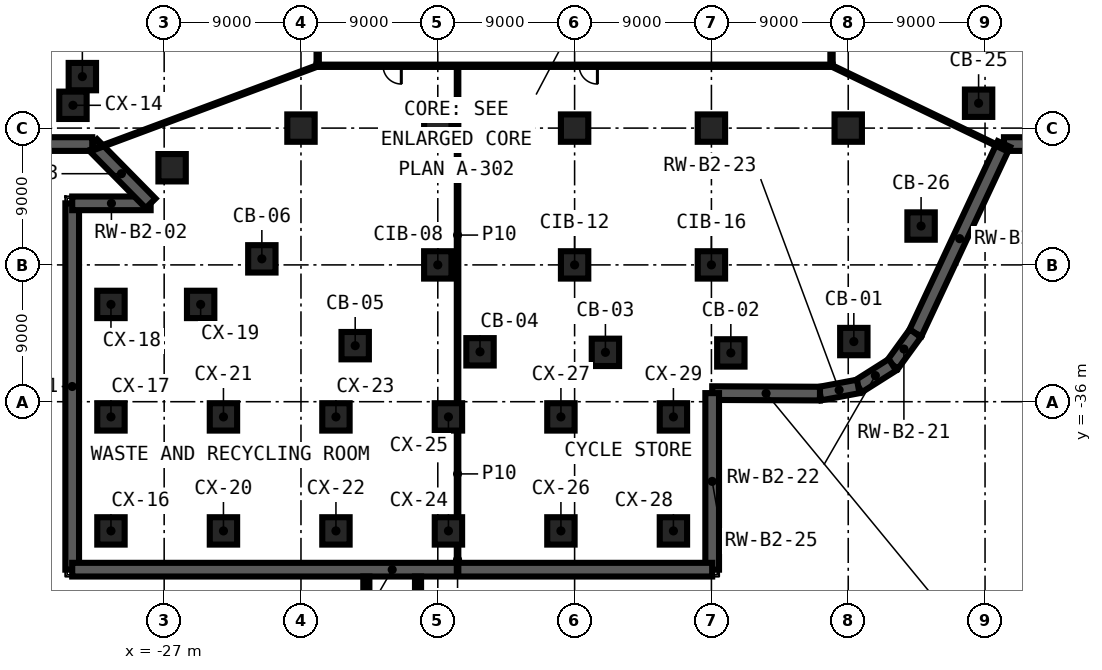
"""IFC4 building model, lengths in metres.
Left out: names, types, materials, properties, quantities, classifications, styles, units other than length and angle.
Written with IfcOpenShell. Run it as: python <this file> out.ifc"""

import sys

from ifc_helpers import new_model, si_unit, direction, frame, frame_2d, origin, origin_2d, place, context, subcontext, project, spatial, rectangle, extrude, element, fill, save


model = new_model("IFC4")
c1 = context("Model", 3, precision=1e-05, world=origin(), true_north=direction((0.0, 1.0)))
c2 = subcontext(c1, "Body", "Model", "MODEL_VIEW")
j1 = project(units=[si_unit("LENGTHUNIT", "METRE"), si_unit("PLANEANGLEUNIT", "RADIAN")], contexts=[c1])
p1 = place(None, origin())
s1 = spatial("IfcSite", under=j1, at=p1, CompositionType="ELEMENT")
p2 = place(p1, origin())
s2 = spatial("IfcBuilding", under=s1, at=p2, CompositionType="ELEMENT")
p3 = place(p2, frame((0.0, 0.0, -11.5)))
s3 = spatial("IfcBuildingStorey", under=s2, at=p3, CompositionType="ELEMENT", Elevation=-11.5)
for number, where, z_axis, x_axis in (
    (1, (18.368, -32.043, 0.0), (0.0, 0.0, 1.0), (1.0, 0.0, 0.0)),
    (2, (10.277, -32.79, 0.0), (0.0, 0.0, 1.0), (1.0, 0.0, 0.0)),
    (3, (2.027, -32.753, 0.0), (0.0, 0.0, 1.0), (1.0, 0.0, 0.0)),
    (4, (-6.222, -32.717, 0.0), (0.0, 0.0, 1.0), (1.0, 0.0, 0.0)),
    (5, (-14.434, -32.313, 0.0), (0.0, 0.0, 1.0), (1.0, 0.0, 0.0)),
    (6, (-20.574, -26.602, 0.0), (0.0, 0.0, 1.0), (1.0, 0.0, 0.0)),
    (7, (-26.478, -20.608, 0.0), (0.0, 0.0, 1.0), (1.0, 0.0, 0.0)),
    (8, (-32.382, -14.613, 0.0), (0.0, 0.0, 1.0), (1.0, 0.0, 0.0)),
    (9, (26.576, -16.364, 0.0), (0.0, 0.0, 1.0), (1.0, 0.0, 0.0)),
    (10, (22.792, -24.443, 0.0), (0.0, 0.0, 1.0), (1.0, 0.0, 0.0)),
    (11, (-18.0, -18.0, 0.0), (0.0, 0.0, 1.0), (1.0, 0.0, 0.0)),
    (12, (-9.0, -27.0, 0.0), (0.0, 0.0, 1.0), (1.0, 0.0, 0.0)),
    (13, (-9.0, -18.0, 0.0), (0.0, 0.0, 1.0), (1.0, 0.0, 0.0)),
    (14, (0.0, -27.0, 0.0), (0.0, 0.0, 1.0), (1.0, 0.0, 0.0)),
    (15, (0.0, -18.0, 0.0), (0.0, 0.0, 1.0), (1.0, 0.0, 0.0)),
    (16, (9.0, -27.0, 0.0), (0.0, 0.0, 1.0), (1.0, 0.0, 0.0)),
    (17, (9.0, -18.0, 0.0), (0.0, 0.0, 1.0), (1.0, 0.0, 0.0)),
    (18, (18.0, -18.0, 0.0), (0.0, 0.0, 1.0), (1.0, 0.0, 0.0)),
    (19, (-33.0, -16.5, 0.0), (0.0, 0.0, 1.0), (1.0, 0.0, 0.0)),
    (20, (-30.5, -44.5, 0.0), (0.0, 0.0, 1.0), (1.0, 0.0, 0.0)),
    (21, (-30.5, -37.0, 0.0), (0.0, 0.0, 1.0), (1.0, 0.0, 0.0)),
    (22, (-30.5, -29.6, 0.0), (0.0, 0.0, 1.0), (1.0, 0.0, 0.0)),
    (23, (-24.6, -29.6, 0.0), (0.0, 0.0, 1.0), (1.0, 0.0, 0.0)),
    (24, (-23.1, -44.5, 0.0), (0.0, 0.0, 1.0), (1.0, 0.0, 0.0)),
    (25, (-23.1, -37.0, 0.0), (0.0, 0.0, 1.0), (1.0, 0.0, 0.0)),
    (26, (-15.7, -44.5, 0.0), (0.0, 0.0, 1.0), (1.0, 0.0, 0.0)),
    (27, (-15.7, -37.0, 0.0), (0.0, 0.0, 1.0), (1.0, 0.0, 0.0)),
    (28, (-8.3, -44.5, 0.0), (0.0, 0.0, 1.0), (1.0, 0.0, 0.0)),
    (29, (-8.3, -37.0, 0.0), (0.0, 0.0, 1.0), (1.0, 0.0, 0.0)),
    (30, (-0.9, -44.5, 0.0), (0.0, 0.0, 1.0), (1.0, 0.0, 0.0)),
    (31, (-0.9, -37.0, 0.0), (0.0, 0.0, 1.0), (1.0, 0.0, 0.0)),
    (32, (6.5, -44.5, 0.0), (0.0, 0.0, 1.0), (1.0, 0.0, 0.0)),
    (33, (6.5, -37.0, 0.0), (0.0, 0.0, 1.0), (1.0, 0.0, 0.0)),
):
    element("IfcColumn", number, at=place(p3, frame(where, z_axis=z_axis, x_axis=x_axis)), inside=s3, PredefinedType="COLUMN", context=c2, shape_type="SweptSolid", body=[
        extrude(rectangle(XDim=1.8, YDim=1.8, at=origin_2d()), origin(), (0.0, 0.0, 1.0), 5.1),
    ])
p4 = place(p3, frame((-33.05, -47.05, 0.0), z_axis=(0.0, 0.0, 1.0), x_axis=(0.0, 1.0, 0.0)))
e34 = element("IfcWall", 34, at=p4, inside=s3, PredefinedType="SHEAR", context=c2, shape_type="SweptSolid", body=[
    extrude(rectangle(XDim=24.1, YDim=0.9, at=frame_2d((12.05, 0.0))), origin(), (0.0, 0.0, 1.0), 5.1),
])
p5 = place(p3, frame((-33.05, -22.95, 0.0), z_axis=(0.0, 0.0, 1.0), x_axis=(1.0, 0.0, 0.0)))
e35 = element("IfcWall", 35, at=p5, inside=s3, PredefinedType="SHEAR", context=c2, shape_type="SweptSolid", body=[
    extrude(rectangle(XDim=5.16, YDim=0.9, at=frame_2d((2.58, 0.0))), origin(), (0.0, 0.0, 1.0), 5.1),
])
p6 = place(p3, frame((-27.89, -22.95, 0.0), z_axis=(0.0, 0.0, 1.0), x_axis=(-0.70171190232, 0.71246081025, 0.0)))
e36 = element("IfcWall", 36, at=p6, inside=s3, PredefinedType="SHEAR", context=c2, shape_type="SweptSolid", body=[
    extrude(rectangle(XDim=5.474, YDim=0.9, at=frame_2d((2.737, 0.0))), origin(), (0.0, 0.0, 1.0), 5.1),
])
p7 = place(p3, frame((-31.731, -19.05, 0.0), z_axis=(0.0, 0.0, 1.0), x_axis=(-1.0, 0.0, 0.0)))
e37 = element("IfcWall", 37, at=p7, inside=s3, PredefinedType="SHEAR", context=c2, shape_type="SweptSolid", body=[
    extrude(rectangle(XDim=27.319, YDim=0.9, at=frame_2d((13.659, 0.0))), origin(), (0.0, 0.0, 1.0), 5.1),
])
p8 = place(p3, frame((59.05, -19.05, 0.0), z_axis=(0.0, 0.0, 1.0), x_axis=(-1.0, 0.0, 0.0)))
e38 = element("IfcWall", 38, at=p8, inside=s3, PredefinedType="SHEAR", context=c2, shape_type="SweptSolid", body=[
    extrude(rectangle(XDim=30.806, YDim=0.9, at=frame_2d((15.403, 0.0))), origin(), (0.0, 0.0, 1.0), 5.1),
])
p9 = place(p3, frame((28.244, -19.05, 0.0), z_axis=(0.0, 0.0, 1.0), x_axis=(-0.424123010069, -0.905604589393, 0.0)))
e39 = element("IfcWall", 39, at=p9, inside=s3, PredefinedType="SHEAR", context=c2, shape_type="SweptSolid", body=[
    extrude(rectangle(XDim=13.744, YDim=0.9, at=frame_2d((6.872, 0.0))), origin(), (0.0, 0.0, 1.0), 5.1),
])
p10 = place(p3, frame((22.415, -31.497, 0.0), z_axis=(0.0, 0.0, 1.0), x_axis=(-0.587162736068, -0.809468913161, 0.0)))
e40 = element("IfcWall", 40, at=p10, inside=s3, PredefinedType="SHEAR", context=c2, shape_type="SweptSolid", body=[
    extrude(rectangle(XDim=2.562, YDim=0.9, at=frame_2d((1.281, 0.0))), origin(), (0.0, 0.0, 1.0), 5.1),
])
p11 = place(p3, frame((20.91, -33.571, 0.0), z_axis=(0.0, 0.0, 1.0), x_axis=(-0.845024751893, -0.534727190901, 0.0)))
e41 = element("IfcWall", 41, at=p11, inside=s3, PredefinedType="SHEAR", context=c2, shape_type="SweptSolid", body=[
    extrude(rectangle(XDim=2.664, YDim=0.9, at=frame_2d((1.332, 0.0))), origin(), (0.0, 0.0, 1.0), 5.1),
])
p12 = place(p3, frame((18.659, -34.995, 0.0), z_axis=(0.0, 0.0, 1.0), x_axis=(-0.98292500595, -0.184006610421, 0.0)))
e42 = element("IfcWall", 42, at=p12, inside=s3, PredefinedType="SHEAR", context=c2, shape_type="SweptSolid", body=[
    extrude(rectangle(XDim=2.562, YDim=0.9, at=frame_2d((1.281, 0.0))), origin(), (0.0, 0.0, 1.0), 5.1),
])
p13 = place(p3, frame((16.141, -35.467, 0.0), z_axis=(0.0, 0.0, 1.0), x_axis=(-0.999989983008, 0.004475922662, 0.0)))
e43 = element("IfcWall", 43, at=p13, inside=s3, PredefinedType="SHEAR", context=c2, shape_type="SweptSolid", body=[
    extrude(rectangle(XDim=7.091, YDim=0.9, at=frame_2d((3.545, 0.0))), origin(), (0.0, 0.0, 1.0), 5.1),
])
p14 = place(p3, frame((9.05, -35.435, 0.0), z_axis=(0.0, 0.0, 1.0), x_axis=(0.0, -1.0, 0.0)))
e44 = element("IfcWall", 44, at=p14, inside=s3, PredefinedType="SHEAR", context=c2, shape_type="SweptSolid", body=[
    extrude(rectangle(XDim=11.615, YDim=0.9, at=frame_2d((5.808, 0.0))), origin(), (0.0, 0.0, 1.0), 5.1),
])
p15 = place(p3, frame((9.05, -47.05, 0.0), z_axis=(0.0, 0.0, 1.0), x_axis=(-1.0, 0.0, 0.0)))
e45 = element("IfcWall", 45, at=p15, inside=s3, PredefinedType="SHEAR", context=c2, shape_type="SweptSolid", body=[
    extrude(rectangle(XDim=42.1, YDim=0.9, at=frame_2d((21.05, 0.0))), origin(), (0.0, 0.0, 1.0), 5.1),
])
p16 = place(p3, frame((16.975, -13.9, 0.0), z_axis=(0.0, 0.0, 1.0), x_axis=(-1.0, 0.0, 0.0)))
e46 = element("IfcWall", 46, at=p16, inside=s3, PredefinedType="PARTITIONING", context=c2, shape_type="SweptSolid", body=[
    extrude(rectangle(XDim=33.95, YDim=0.15, at=frame_2d((16.975, 0.0))), origin(), (0.0, 0.0, 1.0), 5.1),
])
p17 = place(p16, frame((28.375, 0.0, 0.0)))
e47 = element("IfcOpeningElement", 47, at=p17, cuts=e46, PredefinedType="OPENING", context=c2, shape_type="SweptSolid", body=[
    extrude(rectangle(XDim=1.2, YDim=2.1, at=frame_2d((0.6, 1.05))), frame((0.0, 0.085, 0.0), z_axis=(0.0, -1.0, 0.0), x_axis=(1.0, 0.0, 0.0)), (0.0, 0.0, 1.0), 0.17),
])
p18 = place(p16, frame((15.475, 0.0, 0.0)))
e48 = element("IfcOpeningElement", 48, at=p18, cuts=e46, PredefinedType="OPENING", context=c2, shape_type="SweptSolid", body=[
    extrude(rectangle(XDim=1.2, YDim=2.1, at=frame_2d((0.6, 1.05))), frame((0.0, 0.085, 0.0), z_axis=(0.0, -1.0, 0.0), x_axis=(1.0, 0.0, 0.0)), (0.0, 0.0, 1.0), 0.17),
])
p19 = place(p3, frame((-31.796, -19.454, 0.0), z_axis=(0.0, 0.0, 1.0), x_axis=(0.936976966906, 0.349391132526, 0.0)))
e49 = element("IfcWall", 49, at=p19, inside=s3, PredefinedType="PARTITIONING", context=c2, shape_type="SweptSolid", body=[
    extrude(rectangle(XDim=15.898, YDim=0.1, at=frame_2d((7.949, 0.0))), origin(), (0.0, 0.0, 1.0), 5.1),
])
p20 = place(p3, frame((16.9, 13.825, 0.0), z_axis=(0.0, 0.0, 1.0), x_axis=(0.0, -1.0, 0.0)))
e50 = element("IfcWall", 50, at=p20, inside=s3, PredefinedType="PARTITIONING", context=c2, shape_type="SweptSolid", body=[
    extrude(rectangle(XDim=27.65, YDim=0.15, at=frame_2d((13.825, 0.0))), origin(), (0.0, 0.0, 1.0), 5.1),
])
p21 = place(p20, frame((18.445, 0.0, 0.0)))
e51 = element("IfcOpeningElement", 51, at=p21, cuts=e50, PredefinedType="OPENING", context=c2, shape_type="SweptSolid", body=[
    extrude(rectangle(XDim=1.2, YDim=2.1, at=frame_2d((0.6, 1.05))), frame((0.0, 0.085, 0.0), z_axis=(0.0, -1.0, 0.0), x_axis=(1.0, 0.0, 0.0)), (0.0, 0.0, 1.0), 0.17),
])
p22 = place(p3, frame((-7.7, -47.38, 0.0), z_axis=(0.0, 0.0, 1.0), x_axis=(0.0, 1.0, 0.0)))
e52 = element("IfcWall", 52, at=p22, inside=s3, PredefinedType="PARTITIONING", context=c2, shape_type="SweptSolid", body=[
    extrude(rectangle(XDim=1.98, YDim=0.1, at=frame_2d((0.99, 0.0))), origin(), (0.0, 0.0, 1.0), 5.1),
])
p23 = place(p3, frame((-7.7, -43.6, 0.0), z_axis=(0.0, 0.0, 1.0), x_axis=(0.0, 1.0, 0.0)))
e53 = element("IfcWall", 53, at=p23, inside=s3, PredefinedType="PARTITIONING", context=c2, shape_type="SweptSolid", body=[
    extrude(rectangle(XDim=5.7, YDim=0.1, at=frame_2d((2.85, 0.0))), origin(), (0.0, 0.0, 1.0), 5.1),
])
p24 = place(p3, frame((-7.7, -36.1, 0.0), z_axis=(0.0, 0.0, 1.0), x_axis=(0.0, 1.0, 0.0)))
e54 = element("IfcWall", 54, at=p24, inside=s3, PredefinedType="PARTITIONING", context=c2, shape_type="SweptSolid", body=[
    extrude(rectangle(XDim=22.125, YDim=0.1, at=frame_2d((11.062, 0.0))), origin(), (0.0, 0.0, 1.0), 5.1),
])
p25 = place(p3, frame((-16.9, -13.825, 0.0), z_axis=(0.0, 0.0, 1.0), x_axis=(0.0, 1.0, 0.0)))
e55 = element("IfcWall", 55, at=p25, inside=s3, PredefinedType="PARTITIONING", context=c2, shape_type="SweptSolid", body=[
    extrude(rectangle(XDim=27.65, YDim=0.15, at=frame_2d((13.825, 0.0))), origin(), (0.0, 0.0, 1.0), 5.1),
])
p26 = place(p25, frame((18.445, 0.0, 0.0)))
e56 = element("IfcOpeningElement", 56, at=p26, cuts=e55, PredefinedType="OPENING", context=c2, shape_type="SweptSolid", body=[
    extrude(rectangle(XDim=1.2, YDim=2.1, at=frame_2d((0.6, 1.05))), frame((0.0, 0.085, 0.0), z_axis=(0.0, -1.0, 0.0), x_axis=(1.0, 0.0, 0.0)), (0.0, 0.0, 1.0), 0.17),
])
p27 = place(p3, frame((16.9, -13.9, 0.0), z_axis=(0.0, 0.0, 1.0), x_axis=(0.901001946138, -0.433815044754, 0.0)))
e57 = element("IfcWall", 57, at=p27, inside=s3, PredefinedType="PARTITIONING", context=c2, shape_type="SweptSolid", body=[
    extrude(rectangle(XDim=12.788, YDim=0.1, at=frame_2d((6.394, 0.0))), origin(), (0.0, 0.0, 1.0), 5.1),
])
p28 = place(p2, origin())
s4 = spatial("IfcBuildingStorey", under=s2, at=p28, CompositionType="ELEMENT", Elevation=0.0)
for number, where, z_axis, x_axis in (
    (58, (-13.7, -47.5, -17.0), (0.0, 0.0, 1.0), (0.0, -1.0, 0.0)),
    (59, (-10.3, -47.5, -17.0), (0.0, 0.0, 1.0), (0.0, -1.0, 0.0)),
):
    element("IfcWall", number, at=place(p28, frame(where, z_axis=z_axis, x_axis=x_axis)), inside=s4, PredefinedType="SHEAR", context=c2, shape_type="SweptSolid", body=[
        extrude(rectangle(XDim=8.6, YDim=0.4, at=frame_2d((4.3, 0.0))), origin(), (0.0, 0.0, 1.0), 16.7),
    ])
p29 = place(p17, origin())
e60 = element("IfcDoor", 60, at=p29, inside=s3, OperationType="SINGLE_SWING_LEFT", PredefinedType="DOOR", context=c2, shape_type="SweptSolid", body=[
    extrude(rectangle(XDim=1.2, YDim=2.1, at=frame_2d((0.6, 1.05))), frame((0.0, 0.025, 0.0), z_axis=(0.0, -1.0, 0.0), x_axis=(1.0, 0.0, 0.0)), (0.0, 0.0, 1.0), 0.05),
])
fill(e47, e60)
p30 = place(p18, origin())
e61 = element("IfcDoor", 61, at=p30, inside=s3, OperationType="SINGLE_SWING_RIGHT", PredefinedType="DOOR", context=c2, shape_type="SweptSolid", body=[
    extrude(rectangle(XDim=1.2, YDim=2.1, at=frame_2d((0.6, 1.05))), frame((0.0, 0.025, 0.0), z_axis=(0.0, -1.0, 0.0), x_axis=(1.0, 0.0, 0.0)), (0.0, 0.0, 1.0), 0.05),
])
fill(e48, e61)
save(model, sys.argv[1])
